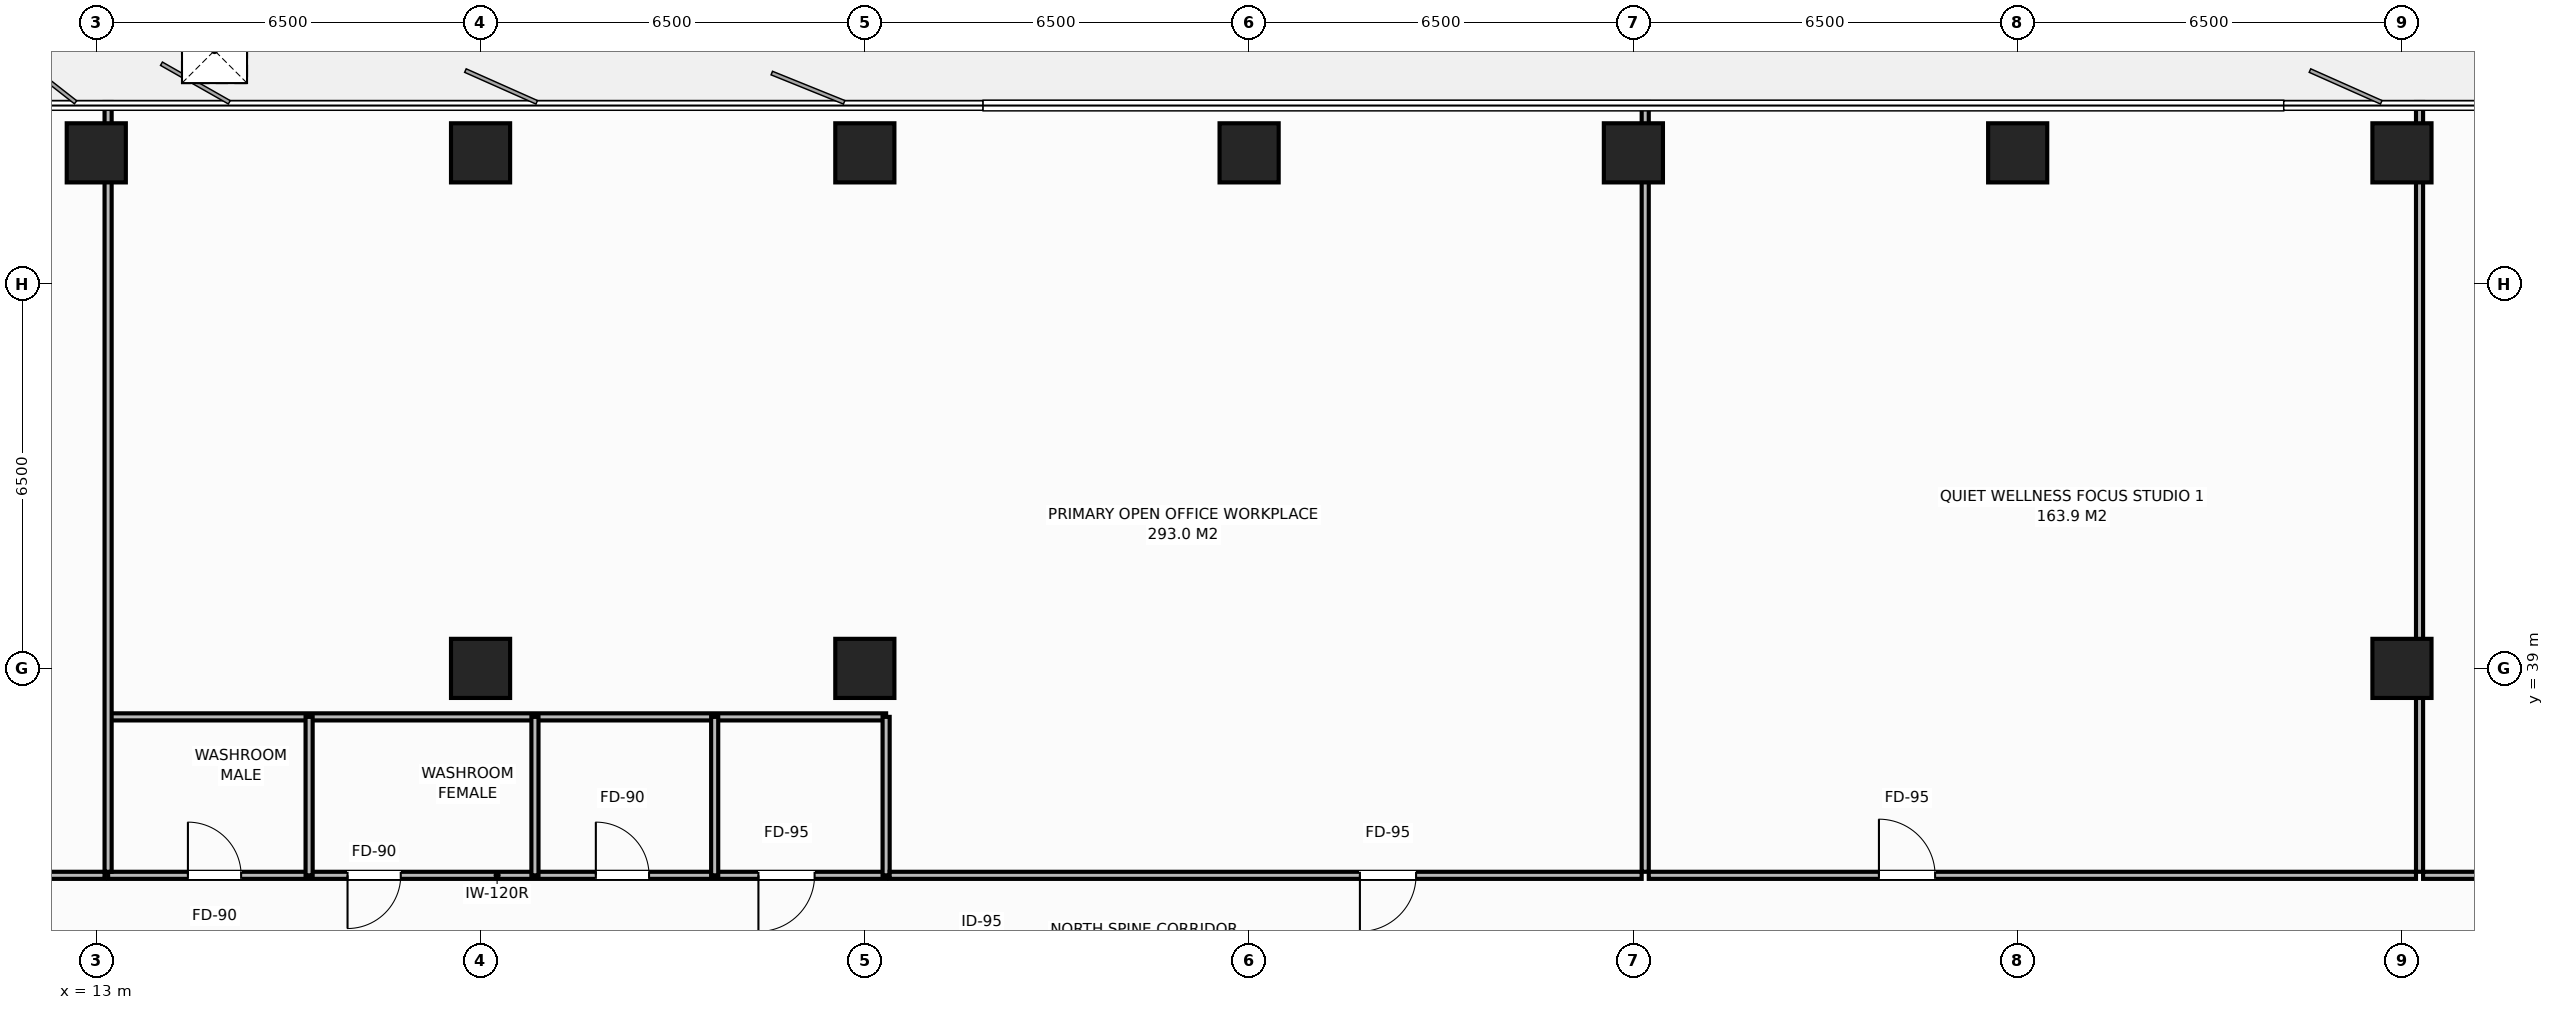
"""IFC4 building model, lengths in metres.
Left out: names, types, materials, properties, quantities, classifications, styles, units other than length and angle.
Written with IfcOpenShell. Run it as: python <this file> out.ifc"""

import sys

from ifc_helpers import new_model, si_unit, direction, frame, frame_2d, origin, origin_2d, place, context, subcontext, project, spatial, rectangle, extrude, element, fill, save


model = new_model("IFC4")
c1 = context("Model", 3, precision=1e-05, world=origin(), true_north=direction((0.0, 1.0)))
c2 = subcontext(c1, "Body", "Model", "MODEL_VIEW")
j1 = project(units=[si_unit("LENGTHUNIT", "METRE"), si_unit("PLANEANGLEUNIT", "RADIAN")], contexts=[c1])
p1 = place(None, origin())
s1 = spatial("IfcSite", under=j1, at=p1, CompositionType="ELEMENT")
p2 = place(p1, origin())
s2 = spatial("IfcBuilding", under=s1, at=p2, CompositionType="ELEMENT")
p3 = place(p2, frame((0.0, 0.0, 144.2)))
s3 = spatial("IfcBuildingStorey", under=s2, at=p3, CompositionType="ELEMENT", Elevation=144.2)
for number, where, z_axis, x_axis in (
    (1, (19.5, 39.0, 0.0), (0.0, 0.0, 1.0), (1.0, 0.0, 0.0)),
    (2, (26.0, 39.0, 0.0), (0.0, 0.0, 1.0), (1.0, 0.0, 0.0)),
    (3, (52.0, 39.0, 0.0), (0.0, 0.0, 1.0), (1.0, 0.0, 0.0)),
    (4, (13.0, 47.72, 0.0), (0.0, 0.0, 1.0), (1.0, 0.0, 0.0)),
    (5, (19.5, 47.72, 0.0), (0.0, 0.0, 1.0), (1.0, 0.0, 0.0)),
    (6, (26.0, 47.72, 0.0), (0.0, 0.0, 1.0), (1.0, 0.0, 0.0)),
    (7, (32.5, 47.72, 0.0), (0.0, 0.0, 1.0), (1.0, 0.0, 0.0)),
    (8, (39.0, 47.72, 0.0), (0.0, 0.0, 1.0), (1.0, 0.0, 0.0)),
    (9, (45.5, 47.72, 0.0), (0.0, 0.0, 1.0), (1.0, 0.0, 0.0)),
    (10, (52.0, 47.72, 0.0), (0.0, 0.0, 1.0), (1.0, 0.0, 0.0)),
):
    element("IfcColumn", number, at=place(p3, frame(where, z_axis=z_axis, x_axis=x_axis)), inside=s3, PredefinedType="COLUMN", context=c2, shape_type="SweptSolid", body=[
        extrude(rectangle(XDim=1.0, YDim=1.0, at=origin_2d()), origin(), (0.0, 0.0, 1.0), 3.8),
    ])
p4 = place(p3, frame((13.2, 35.5, 0.0), z_axis=(0.0, 0.0, 1.0), x_axis=(1.0, 0.0, 0.0)))
e11 = element("IfcWall", 11, at=p4, inside=s3, PredefinedType="PARTITIONING", context=c2, shape_type="SweptSolid", body=[
    extrude(rectangle(XDim=13.16, YDim=0.12, at=frame_2d((6.58, 0.0))), origin(), (0.0, 0.0, 1.0), 3.572),
])
p5 = place(p4, frame((1.35, 0.0, 0.0)))
e12 = element("IfcOpeningElement", 12, at=p5, cuts=e11, PredefinedType="OPENING", context=c2, shape_type="SweptSolid", body=[
    extrude(rectangle(XDim=0.9, YDim=2.15, at=frame_2d((0.45, 1.075))), frame((0.0, 0.07, 0.0), z_axis=(0.0, -1.0, 0.0), x_axis=(1.0, 0.0, 0.0)), (0.0, 0.0, 1.0), 0.14),
])
p6 = place(p4, frame((4.05, 0.0, 0.0)))
e13 = element("IfcOpeningElement", 13, at=p6, cuts=e11, PredefinedType="OPENING", context=c2, shape_type="SweptSolid", body=[
    extrude(rectangle(XDim=0.9, YDim=2.15, at=frame_2d((0.45, 1.075))), frame((0.0, 0.07, 0.0), z_axis=(0.0, -1.0, 0.0), x_axis=(1.0, 0.0, 0.0)), (0.0, 0.0, 1.0), 0.14),
])
p7 = place(p4, frame((8.25, 0.0, 0.0)))
e14 = element("IfcOpeningElement", 14, at=p7, cuts=e11, PredefinedType="OPENING", context=c2, shape_type="SweptSolid", body=[
    extrude(rectangle(XDim=0.9, YDim=2.15, at=frame_2d((0.45, 1.075))), frame((0.0, 0.07, 0.0), z_axis=(0.0, -1.0, 0.0), x_axis=(1.0, 0.0, 0.0)), (0.0, 0.0, 1.0), 0.14),
])
p8 = place(p4, frame((11.0, 0.0, 0.0)))
e15 = element("IfcOpeningElement", 15, at=p8, cuts=e11, PredefinedType="OPENING", context=c2, shape_type="SweptSolid", body=[
    extrude(rectangle(XDim=0.95, YDim=2.15, at=frame_2d((0.475, 1.075))), frame((0.0, 0.07, 0.0), z_axis=(0.0, -1.0, 0.0), x_axis=(1.0, 0.0, 0.0)), (0.0, 0.0, 1.0), 0.14),
])
p9 = place(p3, frame((13.2, 38.18, 0.0), z_axis=(0.0, 0.0, 1.0), x_axis=(1.0, 0.0, 0.0)))
e16 = element("IfcWall", 16, at=p9, inside=s3, PredefinedType="PARTITIONING", context=c2, shape_type="SweptSolid", body=[
    extrude(rectangle(XDim=13.16, YDim=0.12, at=frame_2d((6.58, 0.0))), origin(), (0.0, 0.0, 1.0), 3.572),
])
for number, where, z_axis, x_axis in (
    (17, (16.6, 35.5, 0.0), (0.0, 0.0, 1.0), (0.0, 1.0, 0.0)),
    (18, (20.42, 35.5, 0.0), (0.0, 0.0, 1.0), (0.0, 1.0, 0.0)),
    (19, (23.46, 35.5, 0.0), (0.0, 0.0, 1.0), (0.0, 1.0, 0.0)),
    (20, (26.36, 35.5, 0.0), (0.0, 0.0, 1.0), (0.0, 1.0, 0.0)),
):
    element("IfcWall", number, at=place(p3, frame(where, z_axis=z_axis, x_axis=x_axis)), inside=s3, PredefinedType="PARTITIONING", context=c2, shape_type="SweptSolid", body=[
        extrude(rectangle(XDim=2.68, YDim=0.12, at=frame_2d((1.34, 0.0))), origin(), (0.0, 0.0, 1.0), 3.572),
    ])
p10 = place(p3, frame((13.2, 35.56, 0.0), z_axis=(0.0, 0.0, 1.0), x_axis=(0.0, 1.0, 0.0)))
e21 = element("IfcWall", 21, at=p10, inside=s3, PredefinedType="PARTITIONING", context=c2, shape_type="SweptSolid", body=[
    extrude(rectangle(XDim=13.02, YDim=0.12, at=frame_2d((6.51, 0.0))), origin(), (0.0, 0.0, 1.0), 3.022),
])
p11 = place(p3, frame((3.98, 35.5, 0.0), z_axis=(0.0, 0.0, 1.0), x_axis=(1.0, 0.0, 0.0)))
e22 = element("IfcWall", 22, at=p11, inside=s3, PredefinedType="PARTITIONING", context=c2, shape_type="SweptSolid", body=[
    extrude(rectangle(XDim=9.16, YDim=0.12, at=frame_2d((4.58, 0.0))), origin(), (0.0, 0.0, 1.0), 3.572),
])
p12 = place(p11, frame((6.9, 0.0, 0.0)))
e23 = element("IfcOpeningElement", 23, at=p12, cuts=e22, PredefinedType="OPENING", context=c2, shape_type="SweptSolid", body=[
    extrude(rectangle(XDim=0.95, YDim=2.15, at=frame_2d((0.475, 1.075))), frame((0.0, 0.07, 0.0), z_axis=(0.0, -1.0, 0.0), x_axis=(1.0, 0.0, 0.0)), (0.0, 0.0, 1.0), 0.14),
])
p13 = place(p3, frame((39.2, 35.56, 0.0), z_axis=(0.0, 0.0, 1.0), x_axis=(0.0, 1.0, 0.0)))
e24 = element("IfcWall", 24, at=p13, inside=s3, PredefinedType="PARTITIONING", context=c2, shape_type="SweptSolid", body=[
    extrude(rectangle(XDim=13.02, YDim=0.12, at=frame_2d((6.51, 0.0))), origin(), (0.0, 0.0, 1.0), 3.022),
])
p14 = place(p3, frame((26.42, 35.5, 0.0), z_axis=(0.0, 0.0, 1.0), x_axis=(1.0, 0.0, 0.0)))
e25 = element("IfcWall", 25, at=p14, inside=s3, PredefinedType="PARTITIONING", context=c2, shape_type="SweptSolid", body=[
    extrude(rectangle(XDim=12.72, YDim=0.12, at=frame_2d((6.36, 0.0))), origin(), (0.0, 0.0, 1.0), 3.572),
])
p15 = place(p14, frame((7.954, 0.0, 0.0)))
e26 = element("IfcOpeningElement", 26, at=p15, cuts=e25, PredefinedType="OPENING", context=c2, shape_type="SweptSolid", body=[
    extrude(rectangle(XDim=0.95, YDim=2.15, at=frame_2d((0.475, 1.075))), frame((0.0, 0.07, 0.0), z_axis=(0.0, -1.0, 0.0), x_axis=(1.0, 0.0, 0.0)), (0.0, 0.0, 1.0), 0.14),
])
p16 = place(p3, frame((52.297, 35.56, 0.0), z_axis=(0.0, 0.0, 1.0), x_axis=(0.0, 1.0, 0.0)))
e27 = element("IfcWall", 27, at=p16, inside=s3, PredefinedType="PARTITIONING", context=c2, shape_type="SweptSolid", body=[
    extrude(rectangle(XDim=13.02, YDim=0.12, at=frame_2d((6.51, 0.0))), origin(), (0.0, 0.0, 1.0), 3.572),
])
p17 = place(p3, frame((39.26, 35.5, 0.0), z_axis=(0.0, 0.0, 1.0), x_axis=(1.0, 0.0, 0.0)))
e28 = element("IfcWall", 28, at=p17, inside=s3, PredefinedType="PARTITIONING", context=c2, shape_type="SweptSolid", body=[
    extrude(rectangle(XDim=12.977, YDim=0.12, at=frame_2d((6.489, 0.0))), origin(), (0.0, 0.0, 1.0), 3.572),
])
p18 = place(p17, frame((3.893, 0.0, 0.0)))
e29 = element("IfcOpeningElement", 29, at=p18, cuts=e28, PredefinedType="OPENING", context=c2, shape_type="SweptSolid", body=[
    extrude(rectangle(XDim=0.95, YDim=2.15, at=frame_2d((0.475, 1.075))), frame((0.0, 0.07, 0.0), z_axis=(0.0, -1.0, 0.0), x_axis=(1.0, 0.0, 0.0)), (0.0, 0.0, 1.0), 0.14),
])
p19 = place(p3, frame((52.357, 35.5, 0.0), z_axis=(0.0, 0.0, 1.0), x_axis=(1.0, 0.0, 0.0)))
e30 = element("IfcWall", 30, at=p19, inside=s3, PredefinedType="PARTITIONING", context=c2, shape_type="SweptSolid", body=[
    extrude(rectangle(XDim=8.505, YDim=0.12, at=frame_2d((4.252, 0.0))), origin(), (0.0, 0.0, 1.0), 3.572),
])
p20 = place(p19, frame((3.778, 0.0, 0.0)))
e31 = element("IfcOpeningElement", 31, at=p20, cuts=e30, PredefinedType="OPENING", context=c2, shape_type="SweptSolid", body=[
    extrude(rectangle(XDim=0.95, YDim=2.15, at=frame_2d((0.475, 1.075))), frame((0.0, 0.07, 0.0), z_axis=(0.0, -1.0, 0.0), x_axis=(1.0, 0.0, 0.0)), (0.0, 0.0, 1.0), 0.14),
])
p21 = place(p3, frame((0.0, 0.0, -0.21)))
p22 = place(p21, frame((15.0, 49.45, 0.0)))
p23 = place(p22, frame((0.0, 0.0, 0.21)))
e32 = element("IfcDoor", 32, at=p23, inside=s3, OperationType="SINGLE_SWING_LEFT", PredefinedType="TRAPDOOR", context=c2, shape_type="SweptSolid", body=[
    extrude(rectangle(XDim=1.1, YDim=1.1, at=origin_2d()), origin(), (0.0, 0.0, 1.0), 0.05),
])
p24 = place(p5, origin())
e33 = element("IfcDoor", 33, at=p24, inside=s3, OperationType="SINGLE_SWING_LEFT", PredefinedType="DOOR", context=c2, shape_type="SweptSolid", body=[
    extrude(rectangle(XDim=0.9, YDim=2.15, at=frame_2d((0.45, 1.075))), frame((0.0, 0.025, 0.0), z_axis=(0.0, -1.0, 0.0), x_axis=(1.0, 0.0, 0.0)), (0.0, 0.0, 1.0), 0.05),
])
fill(e12, e33)
p25 = place(p6, origin())
e34 = element("IfcDoor", 34, at=p25, inside=s3, OperationType="SINGLE_SWING_RIGHT", PredefinedType="DOOR", context=c2, shape_type="SweptSolid", body=[
    extrude(rectangle(XDim=0.9, YDim=2.15, at=frame_2d((0.45, 1.075))), frame((0.0, 0.025, 0.0), z_axis=(0.0, -1.0, 0.0), x_axis=(1.0, 0.0, 0.0)), (0.0, 0.0, 1.0), 0.05),
])
fill(e13, e34)
p26 = place(p7, origin())
e35 = element("IfcDoor", 35, at=p26, inside=s3, OperationType="SINGLE_SWING_LEFT", PredefinedType="DOOR", context=c2, shape_type="SweptSolid", body=[
    extrude(rectangle(XDim=0.9, YDim=2.15, at=frame_2d((0.45, 1.075))), frame((0.0, 0.025, 0.0), z_axis=(0.0, -1.0, 0.0), x_axis=(1.0, 0.0, 0.0)), (0.0, 0.0, 1.0), 0.05),
])
fill(e14, e35)
p27 = place(p8, origin())
e36 = element("IfcDoor", 36, at=p27, inside=s3, OperationType="SINGLE_SWING_RIGHT", PredefinedType="DOOR", context=c2, shape_type="SweptSolid", body=[
    extrude(rectangle(XDim=0.95, YDim=2.15, at=frame_2d((0.475, 1.075))), frame((0.0, 0.025, 0.0), z_axis=(0.0, -1.0, 0.0), x_axis=(1.0, 0.0, 0.0)), (0.0, 0.0, 1.0), 0.05),
])
fill(e15, e36)
p28 = place(p15, origin())
e37 = element("IfcDoor", 37, at=p28, inside=s3, OperationType="SINGLE_SWING_RIGHT", PredefinedType="DOOR", context=c2, shape_type="SweptSolid", body=[
    extrude(rectangle(XDim=0.95, YDim=2.15, at=frame_2d((0.475, 1.075))), frame((0.0, 0.025, 0.0), z_axis=(0.0, -1.0, 0.0), x_axis=(1.0, 0.0, 0.0)), (0.0, 0.0, 1.0), 0.05),
])
fill(e26, e37)
p29 = place(p18, origin())
e38 = element("IfcDoor", 38, at=p29, inside=s3, OperationType="SINGLE_SWING_LEFT", PredefinedType="DOOR", context=c2, shape_type="SweptSolid", body=[
    extrude(rectangle(XDim=0.95, YDim=2.15, at=frame_2d((0.475, 1.075))), frame((0.0, 0.025, 0.0), z_axis=(0.0, -1.0, 0.0), x_axis=(1.0, 0.0, 0.0)), (0.0, 0.0, 1.0), 0.05),
])
fill(e29, e38)
save(model, sys.argv[1])
